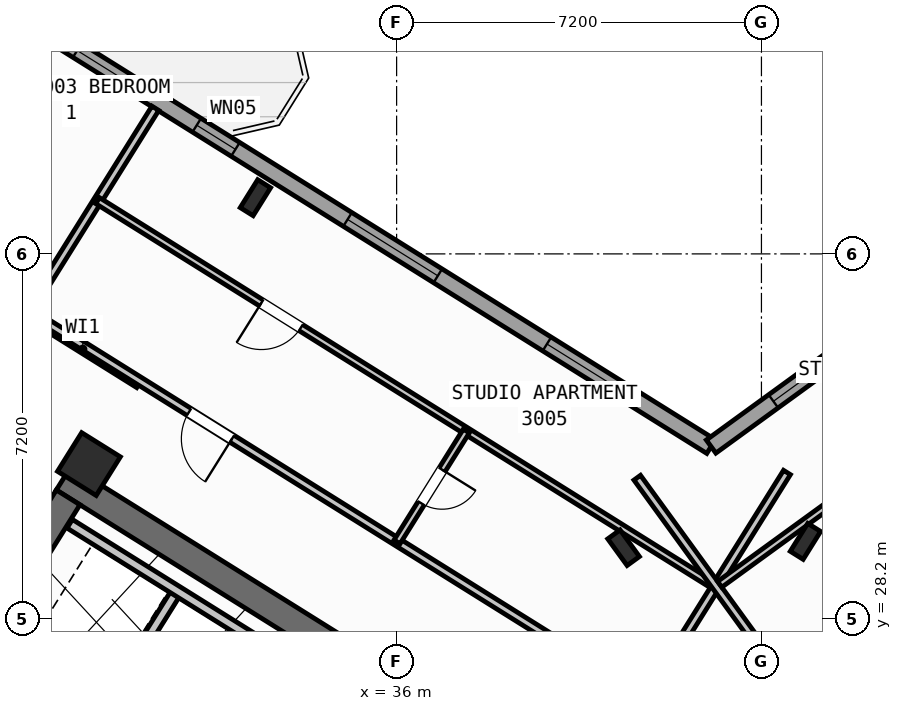
"""IFC4 building model, lengths in metres.
Left out: names, types, materials, properties, quantities, classifications, styles, units other than length and angle.
Written with IfcOpenShell. Run it as: python <this file> out.ifc"""

import sys

from ifc_helpers import new_model, si_unit, direction, frame, frame_2d, origin, origin_2d, place, context, subcontext, project, spatial, rectangle, hollow_rectangle, i_section, extrude, source, transform, mapped, element, fill, save


model = new_model("IFC4")
c1 = context("Model", 3, precision=1e-05, world=origin(), true_north=direction((0.0, 1.0)))
c2 = subcontext(c1, "Body", "Model", "MODEL_VIEW")
j1 = project(units=[si_unit("LENGTHUNIT", "METRE"), si_unit("PLANEANGLEUNIT", "RADIAN")], contexts=[c1])
p1 = place(None, origin())
s1 = spatial("IfcSite", under=j1, at=p1, CompositionType="ELEMENT")
p2 = place(p1, origin())
s2 = spatial("IfcBuilding", under=s1, at=p2, CompositionType="ELEMENT")
p3 = place(p2, frame((0.0, 0.0, 119.7)))
s3 = spatial("IfcBuildingStorey", under=s2, at=p3, CompositionType="ELEMENT", Elevation=119.7)
p4 = place(p3, frame((40.573, 24.01, 0.0), z_axis=(0.0, 0.0, 1.0), x_axis=(-0.848047359947, 0.529920442413, 0.0)))
e1 = element("IfcWall", 1, at=p4, inside=s3, PredefinedType="SHEAR", context=c2, shape_type="SweptSolid", body=[
    extrude(rectangle(XDim=13.14, YDim=0.55, at=frame_2d((6.57, 0.0))), origin(), (0.0, 0.0, 1.0), 3.35),
])
p5 = place(p3, frame((29.517, 30.594, 0.0), z_axis=(0.0, 0.0, 1.0), x_axis=(-0.529906864564, -0.848055844204, 0.0)))
e2 = element("IfcWall", 2, at=p5, inside=s3, PredefinedType="SHEAR", context=c2, shape_type="SweptSolid", body=[
    extrude(rectangle(XDim=3.575, YDim=0.55, at=frame_2d((1.788, 0.0))), origin(), (0.0, 0.0, 1.0), 3.35),
])
p6 = place(p3, frame((44.365, 24.142, 0.0), z_axis=(0.0, 0.0, 1.0), x_axis=(0.809024304885, 0.587775190107, 0.0)))
e3 = element("IfcWall", 3, at=p6, inside=s3, PredefinedType="SHEAR", context=c2, shape_type="SweptSolid", body=[
    extrude(rectangle(XDim=12.34, YDim=0.55, at=frame_2d((6.17, 0.0))), origin(), (0.0, 0.0, 1.0), 3.35),
])
m1 = source(origin(), c2, "Body", "SweptSolid", [
    extrude(i_section(OverallWidth=0.3, OverallDepth=0.65, WebThickness=0.016, FlangeThickness=0.031, at=origin_2d()), origin(), (0.0, 0.0, 1.0), 3.6),
])
for number, where, z_axis, x_axis in (
    (4, (44.068, 29.726, 0.0), (0.0, 0.0, 1.0), (-0.848, 0.53, 0.0)),
    (5, (33.213, 36.509, 0.0), (0.0, 0.0, 1.0), (-0.848, 0.53, 0.0)),
):
    element("IfcColumn", number, at=place(p3, frame(where, z_axis=z_axis, x_axis=x_axis)), inside=s3, PredefinedType="COLUMN", context=c2, shape_type="MappedRepresentation", body=[
        mapped(m1, transform((0.0, 0.0, 0.0), scale=1.0)),
    ])
m2 = source(origin(), c2, "Body", "SweptSolid", [
    extrude(hollow_rectangle(XDim=0.9, YDim=0.9, WallThickness=0.036, at=origin_2d()), origin(), (0.0, 0.0, 1.0), 3.6),
])
p7 = place(p3, frame((29.928, 31.251, 0.0), z_axis=(0.0, 0.0, 1.0), x_axis=(-0.848048096156, 0.529919264233, 0.0)))
e6 = element("IfcColumn", 6, at=p7, inside=s3, PredefinedType="COLUMN", context=c2, shape_type="MappedRepresentation", body=[
    mapped(m2, transform((0.0, 0.0, 0.0), scale=1.0)),
])
p8 = place(p3, frame((40.479, 29.601, 0.0), z_axis=(0.0, 0.0, 1.0), x_axis=(0.809016994375, 0.587785252292, 0.0)))
e7 = element("IfcColumn", 7, at=p8, inside=s3, PredefinedType="COLUMN", context=c2, shape_type="MappedRepresentation", body=[
    mapped(m1, transform((0.0, 0.0, 0.0), scale=1.0)),
])
p9 = place(p3, frame((31.76, 12.183, 0.0), z_axis=(0.0, 0.0, 1.0), x_axis=(-0.848047074256, 0.529920899612, 0.0)))
e8 = element("IfcWall", 8, at=p9, inside=s3, PredefinedType="STANDARD", context=c2, shape_type="SweptSolid", body=[
    extrude(rectangle(XDim=30.652, YDim=0.32, at=frame_2d((15.326, 0.0))), origin(), (0.0, 0.0, 1.0), 3.35),
])
p10 = place(p9, frame((15.153, 0.0, 0.0)))
e9 = element("IfcOpeningElement", 9, at=p10, cuts=e8, PredefinedType="OPENING", context=c2, shape_type="SweptSolid", body=[
    extrude(rectangle(XDim=1.2, YDim=2.15, at=frame_2d((0.6, 1.075))), frame((0.0, 0.17, 0.0), z_axis=(0.0, -1.0, 0.0), x_axis=(1.0, 0.0, 0.0)), (0.0, 0.0, 1.0), 0.34),
])
p11 = place(p9, frame((2.002, 0.0, 0.8)))
e10 = element("IfcOpeningElement", 10, at=p11, cuts=e8, PredefinedType="OPENING", context=c2, shape_type="SweptSolid", body=[
    extrude(rectangle(XDim=2.1, YDim=1.55, at=frame_2d((1.05, 0.775))), frame((0.0, 0.17, 0.0), z_axis=(0.0, -1.0, 0.0), x_axis=(1.0, 0.0, 0.0)), (0.0, 0.0, 1.0), 0.34),
])
p12 = place(p9, frame((7.206, 0.0, 0.8)))
e11 = element("IfcOpeningElement", 11, at=p12, cuts=e8, PredefinedType="OPENING", context=c2, shape_type="SweptSolid", body=[
    extrude(rectangle(XDim=2.1, YDim=1.55, at=frame_2d((1.05, 0.775))), frame((0.0, 0.17, 0.0), z_axis=(0.0, -1.0, 0.0), x_axis=(1.0, 0.0, 0.0)), (0.0, 0.0, 1.0), 0.34),
])
p13 = place(p9, frame((12.648, 0.0, 1.0)))
e12 = element("IfcOpeningElement", 12, at=p13, cuts=e8, PredefinedType="OPENING", context=c2, shape_type="SweptSolid", body=[
    extrude(rectangle(XDim=0.9, YDim=1.25, at=frame_2d((0.45, 0.625))), frame((0.0, 0.17, 0.0), z_axis=(0.0, -1.0, 0.0), x_axis=(1.0, 0.0, 0.0)), (0.0, 0.0, 1.0), 0.34),
])
p14 = place(p9, frame((19.458, 0.0, 0.95)))
e13 = element("IfcOpeningElement", 13, at=p14, cuts=e8, PredefinedType="OPENING", context=c2, shape_type="SweptSolid", body=[
    extrude(rectangle(XDim=1.2, YDim=1.4, at=frame_2d((0.6, 0.7))), frame((0.0, 0.17, 0.0), z_axis=(0.0, -1.0, 0.0), x_axis=(1.0, 0.0, 0.0)), (0.0, 0.0, 1.0), 0.34),
])
p15 = place(p9, frame((21.858, 0.0, 0.95)))
e14 = element("IfcOpeningElement", 14, at=p15, cuts=e8, PredefinedType="OPENING", context=c2, shape_type="SweptSolid", body=[
    extrude(rectangle(XDim=1.2, YDim=1.4, at=frame_2d((0.6, 0.7))), frame((0.0, 0.17, 0.0), z_axis=(0.0, -1.0, 0.0), x_axis=(1.0, 0.0, 0.0)), (0.0, 0.0, 1.0), 0.34),
])
p16 = place(p9, frame((27.266, 0.0, 0.8)))
e15 = element("IfcOpeningElement", 15, at=p16, cuts=e8, PredefinedType="OPENING", context=c2, shape_type="SweptSolid", body=[
    extrude(rectangle(XDim=2.1, YDim=1.55, at=frame_2d((1.05, 0.775))), frame((0.0, 0.17, 0.0), z_axis=(0.0, -1.0, 0.0), x_axis=(1.0, 0.0, 0.0)), (0.0, 0.0, 1.0), 0.34),
])
p17 = place(p3, frame((17.424, 47.083, 0.0), z_axis=(0.0, 0.0, 1.0), x_axis=(0.848049927979, -0.529916332693, 0.0)))
e16 = element("IfcWall", 16, at=p17, inside=s3, PredefinedType="STANDARD", context=c2, shape_type="SweptSolid", body=[
    extrude(rectangle(XDim=29.223, YDim=0.32, at=frame_2d((14.612, 0.0))), origin(), (0.0, 0.0, 1.0), 3.35),
])
p18 = place(p17, frame((8.839, 0.0, 0.0)))
e17 = element("IfcOpeningElement", 17, at=p18, cuts=e16, PredefinedType="OPENING", context=c2, shape_type="SweptSolid", body=[
    extrude(rectangle(XDim=1.05, YDim=2.15, at=frame_2d((0.525, 1.075))), frame((0.0, 0.17, 0.0), z_axis=(0.0, -1.0, 0.0), x_axis=(1.0, 0.0, 0.0)), (0.0, 0.0, 1.0), 0.34),
])
p19 = place(p17, frame((0.719, 0.0, 0.85)))
e18 = element("IfcOpeningElement", 18, at=p19, cuts=e16, PredefinedType="OPENING", context=c2, shape_type="SweptSolid", body=[
    extrude(rectangle(XDim=1.8, YDim=1.5, at=frame_2d((0.9, 0.75))), frame((0.0, 0.17, 0.0), z_axis=(0.0, -1.0, 0.0), x_axis=(1.0, 0.0, 0.0)), (0.0, 0.0, 1.0), 0.34),
])
p20 = place(p17, frame((3.981, 0.0, 0.85)))
e19 = element("IfcOpeningElement", 19, at=p20, cuts=e16, PredefinedType="OPENING", context=c2, shape_type="SweptSolid", body=[
    extrude(rectangle(XDim=1.5, YDim=1.5, at=frame_2d((0.75, 0.75))), frame((0.0, 0.17, 0.0), z_axis=(0.0, -1.0, 0.0), x_axis=(1.0, 0.0, 0.0)), (0.0, 0.0, 1.0), 0.34),
])
p21 = place(p17, frame((7.021, 0.0, 0.95)))
e20 = element("IfcOpeningElement", 20, at=p21, cuts=e16, PredefinedType="OPENING", context=c2, shape_type="SweptSolid", body=[
    extrude(rectangle(XDim=1.2, YDim=1.4, at=frame_2d((0.6, 0.7))), frame((0.0, 0.17, 0.0), z_axis=(0.0, -1.0, 0.0), x_axis=(1.0, 0.0, 0.0)), (0.0, 0.0, 1.0), 0.34),
])
p22 = place(p17, frame((14.471, 0.0, 0.95)))
e21 = element("IfcOpeningElement", 21, at=p22, cuts=e16, PredefinedType="OPENING", context=c2, shape_type="SweptSolid", body=[
    extrude(rectangle(XDim=1.2, YDim=1.4, at=frame_2d((0.6, 0.7))), frame((0.0, 0.17, 0.0), z_axis=(0.0, -1.0, 0.0), x_axis=(1.0, 0.0, 0.0)), (0.0, 0.0, 1.0), 0.34),
])
p23 = place(p17, frame((17.254, 0.0, 1.0)))
e22 = element("IfcOpeningElement", 22, at=p23, cuts=e16, PredefinedType="OPENING", context=c2, shape_type="SweptSolid", body=[
    extrude(rectangle(XDim=0.9, YDim=1.25, at=frame_2d((0.45, 0.625))), frame((0.0, 0.17, 0.0), z_axis=(0.0, -1.0, 0.0), x_axis=(1.0, 0.0, 0.0)), (0.0, 0.0, 1.0), 0.34),
])
p24 = place(p17, frame((20.764, 0.0, 0.8)))
e23 = element("IfcOpeningElement", 23, at=p24, cuts=e16, PredefinedType="OPENING", context=c2, shape_type="SweptSolid", body=[
    extrude(rectangle(XDim=2.1, YDim=1.55, at=frame_2d((1.05, 0.775))), frame((0.0, 0.17, 0.0), z_axis=(0.0, -1.0, 0.0), x_axis=(1.0, 0.0, 0.0)), (0.0, 0.0, 1.0), 0.34),
])
p25 = place(p17, frame((25.403, 0.0, 0.8)))
e24 = element("IfcOpeningElement", 24, at=p25, cuts=e16, PredefinedType="OPENING", context=c2, shape_type="SweptSolid", body=[
    extrude(rectangle(XDim=2.1, YDim=1.55, at=frame_2d((1.05, 0.775))), frame((0.0, 0.17, 0.0), z_axis=(0.0, -1.0, 0.0), x_axis=(1.0, 0.0, 0.0)), (0.0, 0.0, 1.0), 0.34),
])
p26 = place(p3, frame((42.207, 31.597, 0.0), z_axis=(0.0, 0.0, 1.0), x_axis=(0.809020333377, 0.587780656523, 0.0)))
e25 = element("IfcWall", 25, at=p26, inside=s3, PredefinedType="STANDARD", context=c2, shape_type="SweptSolid", body=[
    extrude(rectangle(XDim=15.223, YDim=0.32, at=frame_2d((7.611, 0.0))), origin(), (0.0, 0.0, 1.0), 3.35),
])
p27 = place(p26, frame((12.82, 0.0, 0.0)))
e26 = element("IfcOpeningElement", 26, at=p27, cuts=e25, PredefinedType="OPENING", context=c2, shape_type="SweptSolid", body=[
    extrude(rectangle(XDim=1.05, YDim=2.15, at=frame_2d((0.525, 1.075))), frame((0.0, 0.17, 0.0), z_axis=(0.0, -1.0, 0.0), x_axis=(1.0, 0.0, 0.0)), (0.0, 0.0, 1.0), 0.34),
])
p28 = place(p26, frame((1.52, 0.0, 0.8)))
e27 = element("IfcOpeningElement", 27, at=p28, cuts=e25, PredefinedType="OPENING", context=c2, shape_type="SweptSolid", body=[
    extrude(rectangle(XDim=2.1, YDim=1.55, at=frame_2d((1.05, 0.775))), frame((0.0, 0.17, 0.0), z_axis=(0.0, -1.0, 0.0), x_axis=(1.0, 0.0, 0.0)), (0.0, 0.0, 1.0), 0.34),
])
p29 = place(p26, frame((5.76, 0.0, 0.8)))
e28 = element("IfcOpeningElement", 28, at=p29, cuts=e25, PredefinedType="OPENING", context=c2, shape_type="SweptSolid", body=[
    extrude(rectangle(XDim=2.1, YDim=1.55, at=frame_2d((1.05, 0.775))), frame((0.0, 0.17, 0.0), z_axis=(0.0, -1.0, 0.0), x_axis=(1.0, 0.0, 0.0)), (0.0, 0.0, 1.0), 0.34),
])
p30 = place(p26, frame((10.219, 0.0, 1.0)))
e29 = element("IfcOpeningElement", 29, at=p30, cuts=e25, PredefinedType="OPENING", context=c2, shape_type="SweptSolid", body=[
    extrude(rectangle(XDim=0.9, YDim=1.25, at=frame_2d((0.45, 0.625))), frame((0.0, 0.17, 0.0), z_axis=(0.0, -1.0, 0.0), x_axis=(1.0, 0.0, 0.0)), (0.0, 0.0, 1.0), 0.34),
])
p31 = place(p3, frame((31.645, 28.716, 0.0), z_axis=(0.0, 0.0, 1.0), x_axis=(-0.52986693015, -0.848080795876, 0.0)))
e30 = element("IfcWall", 30, at=p31, inside=s3, PredefinedType="STANDARD", context=c2, shape_type="SweptSolid", body=[
    extrude(rectangle(XDim=2.66, YDim=0.2, at=frame_2d((1.33, 0.0))), origin(), (0.0, 0.0, 1.0), 3.34),
])
p32 = place(p3, frame((33.363, 27.69, 0.0), z_axis=(0.0, 0.0, 1.0), x_axis=(-0.848047090064, 0.529920874315, 0.0)))
e31 = element("IfcWall", 31, at=p32, inside=s3, PredefinedType="STANDARD", context=c2, shape_type="SweptSolid", body=[
    extrude(rectangle(XDim=4.498, YDim=0.2, at=frame_2d((2.249, 0.0))), origin(), (0.0, 0.0, 1.0), 3.34),
])
p33 = place(p3, frame((30.914, 32.829, 0.0), z_axis=(0.0, 0.0, 1.0), x_axis=(-0.848008813643, 0.529982124211, 0.0)))
e32 = element("IfcWall", 32, at=p33, inside=s3, PredefinedType="PARTITIONING", context=c2, shape_type="SweptSolid", body=[
    extrude(rectangle(XDim=2.61, YDim=0.16, at=frame_2d((1.305, 0.0))), origin(), (0.0, 0.0, 1.0), 3.34),
])
p34 = place(p3, frame((31.239, 38.274, 0.0), z_axis=(0.0, 0.0, 1.0), x_axis=(-0.529920220799, -0.848047498427, 0.0)))
e33 = element("IfcWall", 33, at=p34, inside=s3, PredefinedType="PARTITIONING", context=c2, shape_type="SweptSolid", body=[
    extrude(rectangle(XDim=9.2, YDim=0.16, at=frame_2d((4.6, 0.0))), origin(), (0.0, 0.0, 1.0), 3.34),
])
p35 = place(p3, frame((29.177, 39.881, 0.0), z_axis=(0.0, 0.0, 1.0), x_axis=(-0.529930649952, -0.848040981463, 0.0)))
e34 = element("IfcWall", 34, at=p35, inside=s3, PredefinedType="PARTITIONING", context=c2, shape_type="SweptSolid", body=[
    extrude(rectangle(XDim=7.07, YDim=0.11, at=frame_2d((3.535, 0.0))), origin(), (0.0, 0.0, 1.0), 3.34),
])
p36 = place(p35, frame((3.0, 0.0, 0.0)))
e35 = element("IfcOpeningElement", 35, at=p36, cuts=e34, PredefinedType="OPENING", context=c2, shape_type="SweptSolid", body=[
    extrude(rectangle(XDim=0.92, YDim=2.08, at=frame_2d((0.46, 1.04))), frame((0.0, 0.065, 0.0), z_axis=(0.0, -1.0, 0.0), x_axis=(1.0, 0.0, 0.0)), (0.0, 0.0, 1.0), 0.13),
])
p37 = place(p3, frame((41.936, 26.012, 0.0), z_axis=(0.0, 0.0, 1.0), x_axis=(-0.848051154596, 0.529914369676, 0.0)))
e36 = element("IfcWall", 36, at=p37, inside=s3, PredefinedType="PARTITIONING", context=c2, shape_type="SweptSolid", body=[
    extrude(rectangle(XDim=15.57, YDim=0.16, at=frame_2d((7.785, 0.0))), origin(), (0.0, 0.0, 1.0), 3.34),
])
p38 = place(p37, frame((10.83, 0.0, 0.0)))
e37 = element("IfcOpeningElement", 37, at=p38, cuts=e36, PredefinedType="OPENING", context=c2, shape_type="SweptSolid", body=[
    extrude(rectangle(XDim=1.0, YDim=2.1, at=frame_2d((0.5, 1.05))), frame((0.0, 0.09, 0.0), z_axis=(0.0, -1.0, 0.0), x_axis=(1.0, 0.0, 0.0)), (0.0, 0.0, 1.0), 0.18),
])
p39 = place(p3, frame((43.704, 31.086, 0.0), z_axis=(0.0, 0.0, 1.0), x_axis=(-0.529906828443, -0.848055866774, 0.0)))
e38 = element("IfcWall", 38, at=p39, inside=s3, PredefinedType="PARTITIONING", context=c2, shape_type="SweptSolid", body=[
    extrude(rectangle(XDim=5.48, YDim=0.16, at=frame_2d((2.74, 0.0))), origin(), (0.0, 0.0, 1.0), 3.34),
])
p40 = place(p3, frame((42.226, 28.873, 0.0), z_axis=(0.0, 0.0, 1.0), x_axis=(-0.848049134363, 0.529917602752, 0.0)))
e39 = element("IfcWall", 39, at=p40, inside=s3, PredefinedType="PLUMBINGWALL", context=c2, shape_type="SweptSolid", body=[
    extrude(rectangle(XDim=14.3, YDim=0.14, at=frame_2d((7.15, 0.0))), origin(), (0.0, 0.0, 1.0), 3.34),
])
p41 = place(p40, frame((9.57, 0.0, 0.0)))
e40 = element("IfcOpeningElement", 40, at=p41, cuts=e39, PredefinedType="OPENING", context=c2, shape_type="SweptSolid", body=[
    extrude(rectangle(XDim=0.92, YDim=2.08, at=frame_2d((0.46, 1.04))), frame((0.0, 0.08, 0.0), z_axis=(0.0, -1.0, 0.0), x_axis=(1.0, 0.0, 0.0)), (0.0, 0.0, 1.0), 0.16),
])
p42 = place(p3, frame((37.375, 31.904, 0.0), z_axis=(0.0, 0.0, 1.0), x_axis=(-0.529913878929, -0.848051461244, 0.0)))
e41 = element("IfcWall", 41, at=p42, inside=s3, PredefinedType="PLUMBINGWALL", context=c2, shape_type="SweptSolid", body=[
    extrude(rectangle(XDim=2.58, YDim=0.14, at=frame_2d((1.29, 0.0))), origin(), (0.0, 0.0, 1.0), 3.34),
])
p43 = place(p42, frame((0.9, 0.0, 0.0)))
e42 = element("IfcOpeningElement", 42, at=p43, cuts=e41, PredefinedType="OPENING", context=c2, shape_type="SweptSolid", body=[
    extrude(rectangle(XDim=0.78, YDim=2.05, at=frame_2d((0.39, 1.025))), frame((0.0, 0.08, 0.0), z_axis=(0.0, -1.0, 0.0), x_axis=(1.0, 0.0, 0.0)), (0.0, 0.0, 1.0), 0.16),
])
p44 = place(p3, frame((42.866, 26.044, 0.0), z_axis=(0.0, 0.0, 1.0), x_axis=(0.809020254154, 0.587780765566, 0.0)))
e43 = element("IfcWall", 43, at=p44, inside=s3, PredefinedType="PARTITIONING", context=c2, shape_type="SweptSolid", body=[
    extrude(rectangle(XDim=14.67, YDim=0.16, at=frame_2d((7.335, 0.0))), origin(), (0.0, 0.0, 1.0), 3.34),
])
p45 = place(p44, frame((10.2, 0.0, 0.0)))
e44 = element("IfcOpeningElement", 44, at=p45, cuts=e43, PredefinedType="OPENING", context=c2, shape_type="SweptSolid", body=[
    extrude(rectangle(XDim=1.0, YDim=2.1, at=frame_2d((0.5, 1.05))), frame((0.0, 0.09, 0.0), z_axis=(0.0, -1.0, 0.0), x_axis=(1.0, 0.0, 0.0)), (0.0, 0.0, 1.0), 0.18),
])
p46 = place(p3, frame((43.969, 26.55, 0.0), z_axis=(0.0, 0.0, 1.0), x_axis=(-0.587776919386, 0.80902304852, 0.0)))
e45 = element("IfcWall", 45, at=p46, inside=s3, PredefinedType="PARTITIONING", context=c2, shape_type="SweptSolid", body=[
    extrude(rectangle(XDim=5.48, YDim=0.16, at=frame_2d((2.74, 0.0))), origin(), (0.0, 0.0, 1.0), 3.34),
])
p47 = place(p3, frame((42.377, 28.878, 0.0), z_axis=(0.0, 0.0, 1.0), x_axis=(0.809020411523, 0.587780548963, 0.0)))
e46 = element("IfcWall", 46, at=p47, inside=s3, PredefinedType="PLUMBINGWALL", context=c2, shape_type="SweptSolid", body=[
    extrude(rectangle(XDim=13.4, YDim=0.14, at=frame_2d((6.7, 0.0))), origin(), (0.0, 0.0, 1.0), 3.34),
])
p48 = place(p47, frame((8.94, 0.0, 0.0)))
e47 = element("IfcOpeningElement", 47, at=p48, cuts=e46, PredefinedType="OPENING", context=c2, shape_type="SweptSolid", body=[
    extrude(rectangle(XDim=0.92, YDim=2.08, at=frame_2d((0.46, 1.04))), frame((0.0, 0.08, 0.0), z_axis=(0.0, -1.0, 0.0), x_axis=(1.0, 0.0, 0.0)), (0.0, 0.0, 1.0), 0.16),
])
m3 = source(origin(), c2, "Body", "SweptSolid", [
    extrude(rectangle(XDim=1.2, YDim=1.4, at=frame_2d((0.6, 0.7))), frame((0.0, 0.03, 0.0), z_axis=(0.0, -1.0, 0.0), x_axis=(1.0, 0.0, 0.0)), (0.0, 0.0, 1.0), 0.06),
])
p49 = place(p22, origin())
e48 = element("IfcWindow", 48, at=p49, inside=s3, PartitioningType="SINGLE_PANEL", PredefinedType="WINDOW", context=c2, shape_type="MappedRepresentation", body=[
    mapped(m3, transform((0.0, 0.0, 0.0), scale=1.0)),
])
fill(e21, e48)
m4 = source(origin(), c2, "Body", "SweptSolid", [
    extrude(rectangle(XDim=0.9, YDim=1.25, at=frame_2d((0.45, 0.625))), frame((0.0, 0.03, 0.0), z_axis=(0.0, -1.0, 0.0), x_axis=(1.0, 0.0, 0.0)), (0.0, 0.0, 1.0), 0.06),
])
p50 = place(p23, origin())
e49 = element("IfcWindow", 49, at=p50, inside=s3, PartitioningType="SINGLE_PANEL", PredefinedType="WINDOW", context=c2, shape_type="MappedRepresentation", body=[
    mapped(m4, transform((0.0, 0.0, 0.0), scale=1.0)),
])
fill(e22, e49)
m5 = source(origin(), c2, "Body", "SweptSolid", [
    extrude(rectangle(XDim=2.1, YDim=1.55, at=frame_2d((1.05, 0.775))), frame((0.0, 0.03, 0.0), z_axis=(0.0, -1.0, 0.0), x_axis=(1.0, 0.0, 0.0)), (0.0, 0.0, 1.0), 0.06),
])
p51 = place(p24, origin())
e50 = element("IfcWindow", 50, at=p51, inside=s3, PartitioningType="SINGLE_PANEL", PredefinedType="WINDOW", context=c2, shape_type="MappedRepresentation", body=[
    mapped(m5, transform((0.0, 0.0, 0.0), scale=1.0)),
])
fill(e23, e50)
p52 = place(p25, origin())
e51 = element("IfcWindow", 51, at=p52, inside=s3, PartitioningType="SINGLE_PANEL", PredefinedType="WINDOW", context=c2, shape_type="MappedRepresentation", body=[
    mapped(m5, transform((0.0, 0.0, 0.0), scale=1.0)),
])
fill(e24, e51)
p53 = place(p28, origin())
e52 = element("IfcWindow", 52, at=p53, inside=s3, PartitioningType="SINGLE_PANEL", PredefinedType="WINDOW", context=c2, shape_type="MappedRepresentation", body=[
    mapped(m5, transform((0.0, 0.0, 0.0), scale=1.0)),
])
fill(e27, e52)
m6 = source(origin(), c2, "Body", "SweptSolid", [
    extrude(rectangle(XDim=1.0, YDim=2.1, at=frame_2d((0.5, 1.05))), frame((0.0, 0.025, 0.0), z_axis=(0.0, -1.0, 0.0), x_axis=(1.0, 0.0, 0.0)), (0.0, 0.0, 1.0), 0.05),
])
p54 = place(p38, origin())
e53 = element("IfcDoor", 53, at=p54, inside=s3, OperationType="SINGLE_SWING_LEFT", PredefinedType="DOOR", context=c2, shape_type="MappedRepresentation", body=[
    mapped(m6, transform((0.0, 0.0, 0.0), scale=1.0)),
])
fill(e37, e53)
m7 = source(origin(), c2, "Body", "SweptSolid", [
    extrude(rectangle(XDim=0.92, YDim=2.08, at=frame_2d((0.46, 1.04))), frame((0.0, 0.025, 0.0), z_axis=(0.0, -1.0, 0.0), x_axis=(1.0, 0.0, 0.0)), (0.0, 0.0, 1.0), 0.05),
])
p55 = place(p41, origin())
e54 = element("IfcDoor", 54, at=p55, inside=s3, OperationType="SINGLE_SWING_RIGHT", PredefinedType="DOOR", context=c2, shape_type="MappedRepresentation", body=[
    mapped(m7, transform((0.0, 0.0, 0.0), scale=1.0)),
])
fill(e40, e54)
m8 = source(origin(), c2, "Body", "SweptSolid", [
    extrude(rectangle(XDim=0.78, YDim=2.05, at=frame_2d((0.39, 1.025))), frame((0.0, 0.025, 0.0), z_axis=(0.0, -1.0, 0.0), x_axis=(1.0, 0.0, 0.0)), (0.0, 0.0, 1.0), 0.05),
])
p56 = place(p43, origin())
e55 = element("IfcDoor", 55, at=p56, inside=s3, OperationType="SINGLE_SWING_LEFT", PredefinedType="DOOR", context=c2, shape_type="MappedRepresentation", body=[
    mapped(m8, transform((0.0, 0.0, 0.0), scale=1.0)),
])
fill(e42, e55)
save(model, sys.argv[1])
